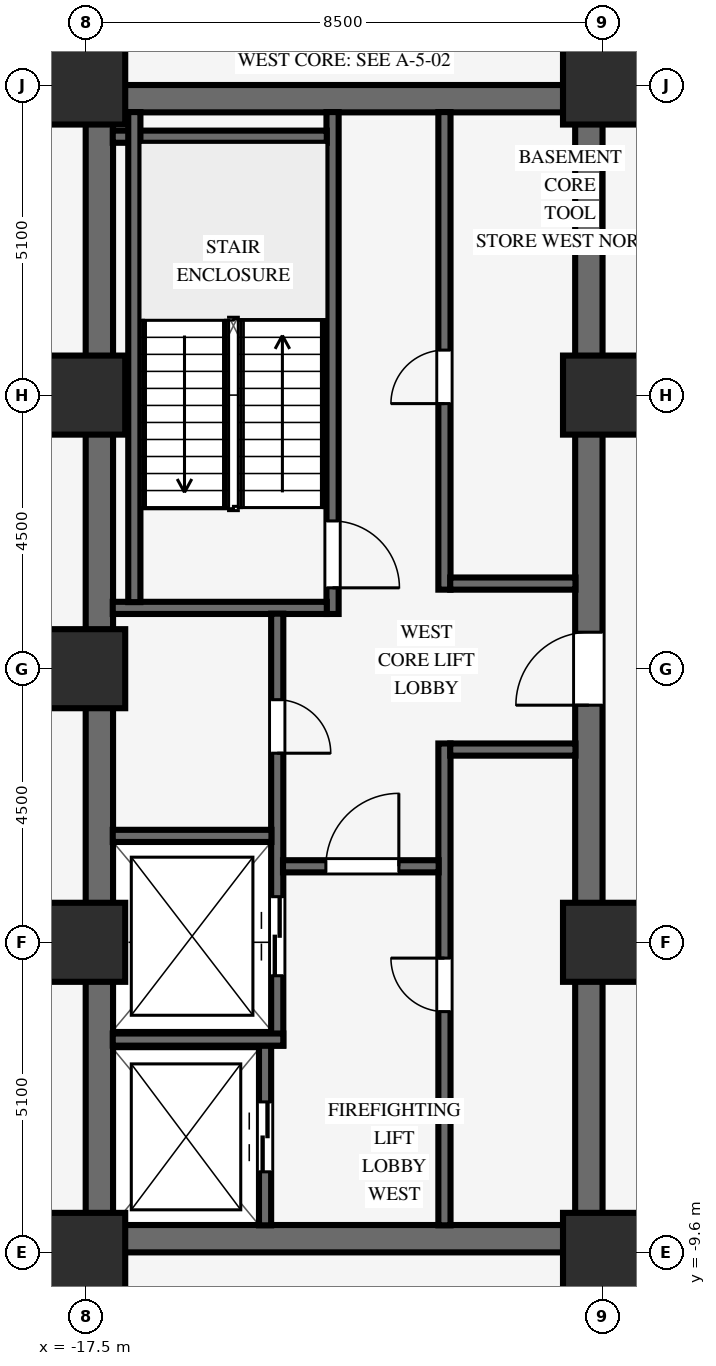
"""IFC4 building model, lengths in metres.
Left out: names, types, materials, properties, quantities, classifications, styles, units other than length and angle.
Written with IfcOpenShell. Run it as: python <this file> out.ifc"""

import sys

from ifc_helpers import new_model, si_unit, direction, frame, frame_2d, origin, origin_2d, place, context, subcontext, project, spatial, rectangle, extrude, source, transform, mapped, element, fill, save


model = new_model("IFC4")
c1 = context("Model", 3, precision=1e-05, world=origin(), true_north=direction((0.0, 1.0)))
c2 = subcontext(c1, "Body", "Model", "MODEL_VIEW")
j1 = project(units=[si_unit("LENGTHUNIT", "METRE"), si_unit("PLANEANGLEUNIT", "RADIAN")], contexts=[c1])
p1 = place(None, origin())
s1 = spatial("IfcSite", under=j1, at=p1, CompositionType="ELEMENT")
p2 = place(p1, origin())
s2 = spatial("IfcBuilding", under=s1, at=p2, CompositionType="ELEMENT")
p3 = place(p2, frame((0.0, 0.0, -4.2)))
s3 = spatial("IfcBuildingStorey", under=s2, at=p3, CompositionType="ELEMENT", Elevation=-4.2)
for number, where, z_axis, x_axis in (
    (1, (-17.5, -9.375, 0.0), (0.0, 0.0, 1.0), (1.0, 0.0, 0.0)),
    (2, (-17.5, 9.375, 0.0), (0.0, 0.0, 1.0), (1.0, 0.0, 0.0)),
):
    element("IfcWall", number, at=place(p3, frame(where, z_axis=z_axis, x_axis=x_axis)), inside=s3, PredefinedType="SHEAR", context=c2, shape_type="SweptSolid", body=[
        extrude(rectangle(XDim=8.5, YDim=0.45, at=frame_2d((4.25, 0.0))), origin(), (0.0, 0.0, 1.0), 3.88),
    ])
p4 = place(p3, frame((-17.275, -9.155, 0.0), z_axis=(0.0, 0.0, 1.0), x_axis=(0.0, 1.0, 0.0)))
e3 = element("IfcWall", 3, at=p4, inside=s3, PredefinedType="SHEAR", context=c2, shape_type="SweptSolid", body=[
    extrude(rectangle(XDim=18.31, YDim=0.45, at=frame_2d((9.155, 0.0))), origin(), (0.0, 0.0, 1.0), 3.88),
])
p5 = place(p3, frame((-9.225, -9.155, 0.0), z_axis=(0.0, 0.0, 1.0), x_axis=(0.0, 1.0, 0.0)))
e4 = element("IfcWall", 4, at=p5, inside=s3, PredefinedType="SHEAR", context=c2, shape_type="SweptSolid", body=[
    extrude(rectangle(XDim=18.31, YDim=0.45, at=frame_2d((9.155, 0.0))), origin(), (0.0, 0.0, 1.0), 3.88),
])
p6 = place(p5, frame((8.555, 0.0, 0.0)))
e5 = element("IfcOpeningElement", 5, at=p6, cuts=e4, PredefinedType="OPENING", context=c2, shape_type="SweptSolid", body=[
    extrude(rectangle(XDim=1.2, YDim=2.15, at=frame_2d((0.6, 1.075))), frame((0.0, 0.235, 0.0), z_axis=(0.0, -1.0, 0.0), x_axis=(1.0, 0.0, 0.0)), (0.0, 0.0, 1.0), 0.47),
])
for number, where, z_axis, x_axis in (
    (6, (-17.5, -9.6, 0.0), (0.0, 0.0, 1.0), (1.0, 0.0, 0.0)),
    (7, (-17.5, -4.5, 0.0), (0.0, 0.0, 1.0), (1.0, 0.0, 0.0)),
    (8, (-17.5, 4.5, 0.0), (0.0, 0.0, 1.0), (1.0, 0.0, 0.0)),
    (9, (-17.5, 9.6, 0.0), (0.0, 0.0, 1.0), (1.0, 0.0, 0.0)),
    (10, (-9.0, -9.6, 0.0), (0.0, 0.0, 1.0), (1.0, 0.0, 0.0)),
    (11, (-9.0, -4.5, 0.0), (0.0, 0.0, 1.0), (1.0, 0.0, 0.0)),
    (12, (-9.0, 4.5, 0.0), (0.0, 0.0, 1.0), (1.0, 0.0, 0.0)),
    (13, (-9.0, 9.6, 0.0), (0.0, 0.0, 1.0), (1.0, 0.0, 0.0)),
    (14, (-17.5, 0.0, 0.0), (0.0, 0.0, 1.0), (1.0, 0.0, 0.0)),
):
    element("IfcColumn", number, at=place(p3, frame(where, z_axis=z_axis, x_axis=x_axis)), inside=s3, PredefinedType="COLUMN", context=c2, shape_type="SweptSolid", body=[
        extrude(rectangle(XDim=1.3, YDim=1.3, at=origin_2d()), origin(), (0.0, 0.0, 1.0), 3.88),
    ])
p7 = place(p3, frame((-13.44, 0.9, 0.0), z_axis=(0.0, 0.0, 1.0), x_axis=(0.0, 1.0, 0.0)))
e15 = element("IfcWall", 15, at=p7, inside=s3, PredefinedType="SHEAR", context=c2, shape_type="SweptSolid", body=[
    extrude(rectangle(XDim=8.255, YDim=0.2, at=frame_2d((4.127, 0.0))), origin(), (0.0, 0.0, 1.0), 3.88),
])
p8 = place(p7, frame((1.53, 0.0, 0.0), z_axis=(0.0, 0.0, 1.0), x_axis=(-1.0, 0.0, 0.0)))
e16 = element("IfcOpeningElement", 16, at=p8, cuts=e15, PredefinedType="OPENING", context=c2, shape_type="SweptSolid", body=[
    extrude(rectangle(XDim=1.1, YDim=2.15, at=frame_2d((0.55, 1.075))), frame((0.0, 0.11, 0.0), z_axis=(0.0, -1.0, 0.0), x_axis=(1.0, 0.0, 0.0)), (0.0, 0.0, 1.0), 0.22),
])
for number, where, z_axis, x_axis in (
    (17, (-17.055, 1.0, 0.0), (0.0, 0.0, 1.0), (1.0, 0.0, 0.0)),
    (18, (-17.055, 8.75, 0.0), (0.0, 0.0, 1.0), (1.0, 0.0, 0.0)),
):
    element("IfcWall", number, at=place(p3, frame(where, z_axis=z_axis, x_axis=x_axis)), inside=s3, PredefinedType="SHEAR", context=c2, shape_type="SweptSolid", body=[
        extrude(rectangle(XDim=3.52, YDim=0.2, at=frame_2d((1.76, 0.0))), origin(), (0.0, 0.0, 1.0), 3.88),
    ])
p9 = place(p3, frame((-16.7, 1.095, 0.0), z_axis=(0.0, 0.0, 1.0), x_axis=(0.0, 1.0, 0.0)))
e19 = element("IfcWall", 19, at=p9, inside=s3, PredefinedType="SHEAR", context=c2, shape_type="SweptSolid", body=[
    extrude(rectangle(XDim=8.06, YDim=0.2, at=frame_2d((4.03, 0.0))), origin(), (0.0, 0.0, 1.0), 3.88),
])
p10 = place(p3, frame((-14.55, -9.155, 0.0), z_axis=(0.0, 0.0, 1.0), x_axis=(0.0, 1.0, 0.0)))
e20 = element("IfcWall", 20, at=p10, inside=s3, PredefinedType="SHEAR", context=c2, shape_type="SweptSolid", body=[
    extrude(rectangle(XDim=2.96, YDim=0.2, at=frame_2d((1.48, 0.0))), origin(), (0.0, 0.0, 1.0), 3.88),
])
p11 = place(p10, frame((0.88, 0.0, 0.0)))
e21 = element("IfcOpeningElement", 21, at=p11, cuts=e20, PredefinedType="OPENING", context=c2, shape_type="SweptSolid", body=[
    extrude(rectangle(XDim=1.15, YDim=2.15, at=frame_2d((0.575, 1.075))), frame((0.0, 0.11, 0.0), z_axis=(0.0, -1.0, 0.0), x_axis=(1.0, 0.0, 0.0)), (0.0, 0.0, 1.0), 0.22),
])
p12 = place(p3, frame((-14.35, -6.2, 0.0), z_axis=(0.0, 0.0, 1.0), x_axis=(0.0, 1.0, 0.0)))
e22 = element("IfcWall", 22, at=p12, inside=s3, PredefinedType="SHEAR", context=c2, shape_type="SweptSolid", body=[
    extrude(rectangle(XDim=7.105, YDim=0.2, at=frame_2d((3.552, 0.0))), origin(), (0.0, 0.0, 1.0), 3.88),
])
p13 = place(p12, frame((5.69, 0.0, 0.0), z_axis=(0.0, 0.0, 1.0), x_axis=(-1.0, 0.0, 0.0)))
e23 = element("IfcOpeningElement", 23, at=p13, cuts=e22, PredefinedType="OPENING", context=c2, shape_type="SweptSolid", body=[
    extrude(rectangle(XDim=0.88, YDim=2.1, at=frame_2d((0.44, 1.05))), frame((0.0, 0.11, 0.0), z_axis=(0.0, -1.0, 0.0), x_axis=(1.0, 0.0, 0.0)), (0.0, 0.0, 1.0), 0.22),
])
p14 = place(p12, frame((1.15, 0.0, 0.0)))
e24 = element("IfcOpeningElement", 24, at=p14, cuts=e22, PredefinedType="OPENING", context=c2, shape_type="SweptSolid", body=[
    extrude(rectangle(XDim=1.3, YDim=2.2, at=frame_2d((0.65, 1.1))), frame((0.0, 0.11, 0.0), z_axis=(0.0, -1.0, 0.0), x_axis=(1.0, 0.0, 0.0)), (0.0, 0.0, 1.0), 0.22),
])
p15 = place(p3, frame((-17.055, -6.1, 0.0), z_axis=(0.0, 0.0, 1.0), x_axis=(1.0, 0.0, 0.0)))
e25 = element("IfcWall", 25, at=p15, inside=s3, PredefinedType="SHEAR", context=c2, shape_type="SweptSolid", body=[
    extrude(rectangle(XDim=2.805, YDim=0.2, at=frame_2d((1.402, 0.0))), origin(), (0.0, 0.0, 1.0), 3.88),
])
p16 = place(p3, frame((-17.055, -2.75, 0.0), z_axis=(0.0, 0.0, 1.0), x_axis=(1.0, 0.0, 0.0)))
e26 = element("IfcWall", 26, at=p16, inside=s3, PredefinedType="SHEAR", context=c2, shape_type="SweptSolid", body=[
    extrude(rectangle(XDim=2.61, YDim=0.2, at=frame_2d((1.305, 0.0))), origin(), (0.0, 0.0, 1.0), 3.88),
])
p17 = place(p3, frame((-11.6, -9.155, 0.0), z_axis=(0.0, 0.0, 1.0), x_axis=(0.0, 1.0, 0.0)))
e27 = element("IfcWall", 27, at=p17, inside=s3, PredefinedType="SHEAR", context=c2, shape_type="SweptSolid", body=[
    extrude(rectangle(XDim=7.925, YDim=0.2, at=frame_2d((3.962, 0.0))), origin(), (0.0, 0.0, 1.0), 3.88),
])
p18 = place(p17, frame((3.515, 0.0, 0.0)))
e28 = element("IfcOpeningElement", 28, at=p18, cuts=e27, PredefinedType="OPENING", context=c2, shape_type="SweptSolid", body=[
    extrude(rectangle(XDim=0.88, YDim=2.1, at=frame_2d((0.44, 1.05))), frame((0.0, 0.11, 0.0), z_axis=(0.0, -1.0, 0.0), x_axis=(1.0, 0.0, 0.0)), (0.0, 0.0, 1.0), 0.22),
])
p19 = place(p3, frame((-14.255, -3.25, 0.0), z_axis=(0.0, 0.0, 1.0), x_axis=(1.0, 0.0, 0.0)))
e29 = element("IfcWall", 29, at=p19, inside=s3, PredefinedType="SHEAR", context=c2, shape_type="SweptSolid", body=[
    extrude(rectangle(XDim=2.56, YDim=0.2, at=frame_2d((1.28, 0.0))), origin(), (0.0, 0.0, 1.0), 3.88),
])
p20 = place(p19, frame((0.705, 0.0, 0.0)))
e30 = element("IfcOpeningElement", 30, at=p20, cuts=e29, PredefinedType="OPENING", context=c2, shape_type="SweptSolid", body=[
    extrude(rectangle(XDim=1.2, YDim=2.15, at=frame_2d((0.6, 1.075))), frame((0.0, 0.11, 0.0), z_axis=(0.0, -1.0, 0.0), x_axis=(1.0, 0.0, 0.0)), (0.0, 0.0, 1.0), 0.22),
])
p21 = place(p3, frame((-11.505, -1.33, 0.0), z_axis=(0.0, 0.0, 1.0), x_axis=(1.0, 0.0, 0.0)))
e31 = element("IfcWall", 31, at=p21, inside=s3, PredefinedType="SHEAR", context=c2, shape_type="SweptSolid", body=[
    extrude(rectangle(XDim=2.06, YDim=0.2, at=frame_2d((1.03, 0.0))), origin(), (0.0, 0.0, 1.0), 3.88),
])
p22 = place(p3, frame((-11.6, 1.3, 0.0), z_axis=(0.0, 0.0, 1.0), x_axis=(0.0, 1.0, 0.0)))
e32 = element("IfcWall", 32, at=p22, inside=s3, PredefinedType="SHEAR", context=c2, shape_type="SweptSolid", body=[
    extrude(rectangle(XDim=7.855, YDim=0.2, at=frame_2d((3.927, 0.0))), origin(), (0.0, 0.0, 1.0), 3.88),
])
p23 = place(p22, frame((3.06, 0.0, 0.0)))
e33 = element("IfcOpeningElement", 33, at=p23, cuts=e32, PredefinedType="OPENING", context=c2, shape_type="SweptSolid", body=[
    extrude(rectangle(XDim=0.88, YDim=2.1, at=frame_2d((0.44, 1.05))), frame((0.0, 0.11, 0.0), z_axis=(0.0, -1.0, 0.0), x_axis=(1.0, 0.0, 0.0)), (0.0, 0.0, 1.0), 0.22),
])
p24 = place(p3, frame((-11.505, 1.4, 0.0), z_axis=(0.0, 0.0, 1.0), x_axis=(1.0, 0.0, 0.0)))
e34 = element("IfcWall", 34, at=p24, inside=s3, PredefinedType="SHEAR", context=c2, shape_type="SweptSolid", body=[
    extrude(rectangle(XDim=2.06, YDim=0.2, at=frame_2d((1.03, 0.0))), origin(), (0.0, 0.0, 1.0), 3.88),
])
m1 = source(origin(), c2, "Body", "SweptSolid", [
    extrude(rectangle(XDim=1.1, YDim=2.15, at=frame_2d((0.55, 1.075))), frame((0.0, 0.025, 0.0), z_axis=(0.0, -1.0, 0.0), x_axis=(1.0, 0.0, 0.0)), (0.0, 0.0, 1.0), 0.05),
])
p25 = place(p8, origin())
e35 = element("IfcDoor", 35, at=p25, inside=s3, OperationType="SINGLE_SWING_RIGHT", PredefinedType="DOOR", context=c2, shape_type="MappedRepresentation", body=[
    mapped(m1, transform((0.0, 0.0, 0.0), scale=1.0)),
])
fill(e16, e35)
m2 = source(origin(), c2, "Body", "SweptSolid", [
    extrude(rectangle(XDim=0.88, YDim=2.1, at=frame_2d((0.44, 1.05))), frame((0.0, 0.025, 0.0), z_axis=(0.0, -1.0, 0.0), x_axis=(1.0, 0.0, 0.0)), (0.0, 0.0, 1.0), 0.05),
])
p26 = place(p13, origin())
e36 = element("IfcDoor", 36, at=p26, inside=s3, OperationType="SINGLE_SWING_RIGHT", PredefinedType="DOOR", context=c2, shape_type="MappedRepresentation", body=[
    mapped(m2, transform((0.0, 0.0, 0.0), scale=1.0)),
])
fill(e23, e36)
m3 = source(origin(), c2, "Body", "SweptSolid", [
    extrude(rectangle(XDim=1.2, YDim=2.15, at=frame_2d((0.6, 1.075))), frame((0.0, 0.025, 0.0), z_axis=(0.0, -1.0, 0.0), x_axis=(1.0, 0.0, 0.0)), (0.0, 0.0, 1.0), 0.05),
])
p27 = place(p20, origin())
e37 = element("IfcDoor", 37, at=p27, inside=s3, OperationType="SINGLE_SWING_RIGHT", PredefinedType="DOOR", context=c2, shape_type="MappedRepresentation", body=[
    mapped(m3, transform((0.0, 0.0, 0.0), scale=1.0)),
])
fill(e30, e37)
p28 = place(p18, origin())
e38 = element("IfcDoor", 38, at=p28, inside=s3, OperationType="SINGLE_SWING_RIGHT", PredefinedType="DOOR", context=c2, shape_type="MappedRepresentation", body=[
    mapped(m2, transform((0.0, 0.0, 0.0), scale=1.0)),
])
fill(e28, e38)
p29 = place(p23, origin())
e39 = element("IfcDoor", 39, at=p29, inside=s3, OperationType="SINGLE_SWING_LEFT", PredefinedType="DOOR", context=c2, shape_type="MappedRepresentation", body=[
    mapped(m2, transform((0.0, 0.0, 0.0), scale=1.0)),
])
fill(e33, e39)
p30 = place(p6, origin())
e40 = element("IfcDoor", 40, at=p30, inside=s3, OperationType="SINGLE_SWING_LEFT", PredefinedType="DOOR", context=c2, shape_type="MappedRepresentation", body=[
    mapped(m3, transform((0.0, 0.0, 0.0), scale=1.0)),
])
fill(e5, e40)
m4 = source(origin(), c2, "Body", "SweptSolid", [
    extrude(rectangle(XDim=1.15, YDim=2.15, at=frame_2d((0.575, 1.075))), frame((0.0, 0.025, 0.0), z_axis=(0.0, -1.0, 0.0), x_axis=(1.0, 0.0, 0.0)), (0.0, 0.0, 1.0), 0.05),
])
p31 = place(p11, origin())
e41 = element("IfcDoor", 41, at=p31, inside=s3, OperationType="DOUBLE_DOOR_SLIDING", PredefinedType="DOOR", context=c2, shape_type="MappedRepresentation", body=[
    mapped(m4, transform((0.0, 0.0, 0.0), scale=1.0)),
])
fill(e21, e41)
m5 = source(origin(), c2, "Body", "SweptSolid", [
    extrude(rectangle(XDim=1.3, YDim=2.2, at=frame_2d((0.65, 1.1))), frame((0.0, 0.025, 0.0), z_axis=(0.0, -1.0, 0.0), x_axis=(1.0, 0.0, 0.0)), (0.0, 0.0, 1.0), 0.05),
])
p32 = place(p14, origin())
e42 = element("IfcDoor", 42, at=p32, inside=s3, OperationType="DOUBLE_DOOR_SLIDING", PredefinedType="DOOR", context=c2, shape_type="MappedRepresentation", body=[
    mapped(m5, transform((0.0, 0.0, 0.0), scale=1.0)),
])
fill(e24, e42)
save(model, sys.argv[1])
